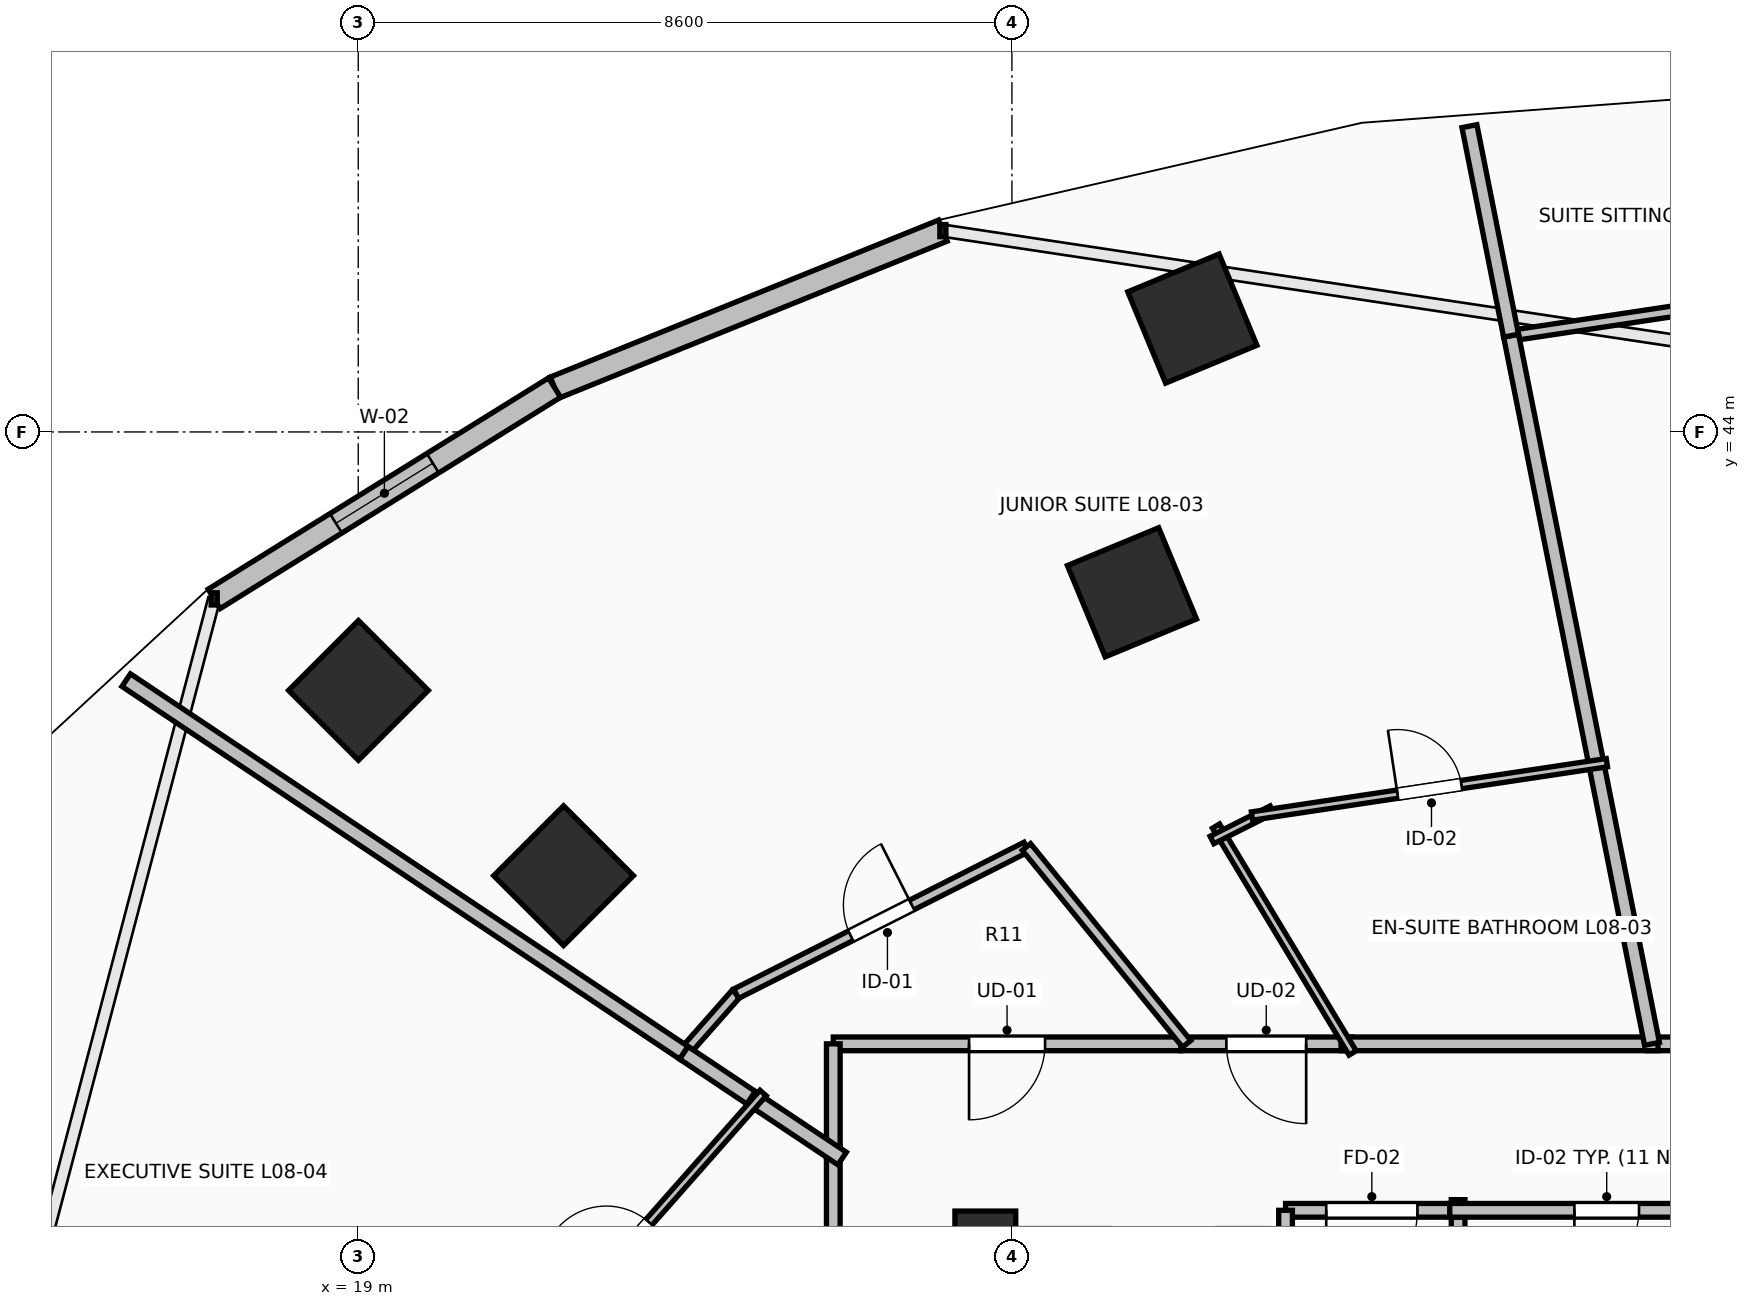
"""IFC4 building model, lengths in metres.
Left out: names, types, materials, properties, quantities, classifications, styles, units other than length and angle.
Written with IfcOpenShell. Run it as: python <this file> out.ifc"""

import sys

from ifc_helpers import new_model, si_unit, direction, frame, frame_2d, origin, origin_2d, place, context, subcontext, project, spatial, rectangle, extrude, element, fill, save


model = new_model("IFC4")
c1 = context("Model", 3, precision=1e-05, world=origin(), true_north=direction((0.0, 1.0)))
c2 = subcontext(c1, "Body", "Model", "MODEL_VIEW")
j1 = project(units=[si_unit("LENGTHUNIT", "METRE"), si_unit("PLANEANGLEUNIT", "RADIAN")], contexts=[c1])
p1 = place(None, origin())
s1 = spatial("IfcSite", under=j1, at=p1, CompositionType="ELEMENT")
p2 = place(p1, origin())
s2 = spatial("IfcBuilding", under=s1, at=p2, CompositionType="ELEMENT")
p3 = place(p2, frame((0.0, 0.0, 34.5)))
s3 = spatial("IfcBuildingStorey", under=s2, at=p3, CompositionType="ELEMENT", Elevation=34.5)
for number, where, z_axis, x_axis in (
    (1, (29.179, 41.891, 0.0), (0.0, 0.0, 1.0), (-0.383, 0.924, 0.0)),
    (2, (21.701, 38.162, 0.0), (0.0, 0.0, 1.0), (-0.707, 0.707, 0.0)),
    (3, (29.974, 45.492, 0.0), (0.0, 0.0, 1.0), (-0.383, 0.924, 0.0)),
    (4, (19.003, 40.6, 0.0), (0.0, 0.0, 1.0), (-0.707, 0.707, 0.0)),
):
    element("IfcColumn", number, at=place(p3, frame(where, z_axis=z_axis, x_axis=x_axis)), inside=s3, PredefinedType="COLUMN", context=c2, shape_type="SweptSolid", body=[
        extrude(rectangle(XDim=1.3, YDim=1.3, at=origin_2d()), origin(), (0.0, 0.0, 1.0), 3.5),
    ])
p4 = place(p3, frame((27.25, 33.15, 0.0), z_axis=(0.0, 0.0, 1.0), x_axis=(1.0, 0.0, 0.0)))
e5 = element("IfcColumn", 5, at=p4, inside=s3, PredefinedType="PILASTER", context=c2, shape_type="SweptSolid", body=[
    extrude(rectangle(XDim=0.8, YDim=1.2, at=origin_2d()), origin(), (0.0, 0.0, 1.0), 3.5),
])
p5 = place(p3, frame((26.692, 46.649, 0.0), z_axis=(0.0, 0.0, 1.0), x_axis=(-0.927095325176, -0.374825636845, 0.0)))
e6 = element("IfcWall", 6, at=p5, inside=s3, PredefinedType="STANDARD", context=c2, shape_type="SweptSolid", body=[
    extrude(rectangle(XDim=5.51, YDim=0.3, at=frame_2d((2.755, 0.0))), origin(), (0.0, 0.0, 1.0), 3.24),
])
p6 = place(p3, frame((21.583, 44.583, 0.0), z_axis=(0.0, 0.0, 1.0), x_axis=(-0.849633724826, -0.527373239404, 0.0)))
e7 = element("IfcWall", 7, at=p6, inside=s3, PredefinedType="STANDARD", context=c2, shape_type="SweptSolid", body=[
    extrude(rectangle(XDim=5.271, YDim=0.3, at=frame_2d((2.635, 0.0))), origin(), (0.0, 0.0, 1.0), 3.24),
])
p7 = place(p6, frame((1.885, 0.0, 0.85)))
e8 = element("IfcOpeningElement", 8, at=p7, cuts=e7, PredefinedType="OPENING", context=c2, shape_type="SweptSolid", body=[
    extrude(rectangle(XDim=1.5, YDim=2.19, at=frame_2d((0.75, 1.095))), frame((0.0, 0.165, 0.0), z_axis=(0.0, -1.0, 0.0), x_axis=(1.0, 0.0, 0.0)), (0.0, 0.0, 1.0), 0.33),
])
p8 = place(p3, frame((33.47, 30.34, 0.0), z_axis=(0.0, 0.0, 1.0), x_axis=(0.0, 1.0, 0.0)))
e9 = element("IfcWall", 9, at=p8, inside=s3, PredefinedType="PARTITIONING", context=c2, shape_type="SweptSolid", body=[
    extrude(rectangle(XDim=3.56, YDim=0.18, at=frame_2d((1.78, 0.0))), origin(), (0.0, 0.0, 1.0), 3.24),
])
p9 = place(p3, frame((33.47, 33.76, 0.0), z_axis=(0.0, 0.0, 1.0), x_axis=(-1.0, 0.0, 0.0)))
e10 = element("IfcWall", 10, at=p9, inside=s3, PredefinedType="PARTITIONING", context=c2, shape_type="SweptSolid", body=[
    extrude(rectangle(XDim=2.27, YDim=0.18, at=frame_2d((1.135, 0.0))), origin(), (0.0, 0.0, 1.0), 3.24),
])
p10 = place(p9, frame((0.535, 0.0, 0.0)))
e11 = element("IfcOpeningElement", 11, at=p10, cuts=e10, PredefinedType="OPENING", context=c2, shape_type="SweptSolid", body=[
    extrude(rectangle(XDim=1.2, YDim=2.15, at=frame_2d((0.6, 1.075))), frame((0.0, 0.105, 0.0), z_axis=(0.0, -1.0, 0.0), x_axis=(1.0, 0.0, 0.0)), (0.0, 0.0, 1.0), 0.21),
])
p11 = place(p3, frame((31.2, 33.76, 0.0), z_axis=(0.0, 0.0, 1.0), x_axis=(0.0, -1.0, 0.0)))
e12 = element("IfcWall", 12, at=p11, inside=s3, PredefinedType="PARTITIONING", context=c2, shape_type="SweptSolid", body=[
    extrude(rectangle(XDim=0.56, YDim=0.18, at=frame_2d((0.28, 0.0))), origin(), (0.0, 0.0, 1.0), 3.24),
])
p12 = place(p3, frame((37.49, 33.76, 0.0), z_axis=(0.0, 0.0, 1.0), x_axis=(-1.0, 0.0, 0.0)))
e13 = element("IfcWall", 13, at=p12, inside=s3, PredefinedType="PARTITIONING", context=c2, shape_type="SweptSolid", body=[
    extrude(rectangle(XDim=4.13, YDim=0.18, at=frame_2d((2.065, 0.0))), origin(), (0.0, 0.0, 1.0), 3.24),
])
p13 = place(p12, frame((1.64, 0.0, 0.0)))
e14 = element("IfcOpeningElement", 14, at=p13, cuts=e13, PredefinedType="OPENING", context=c2, shape_type="SweptSolid", body=[
    extrude(rectangle(XDim=0.85, YDim=2.1, at=frame_2d((0.425, 1.05))), frame((0.0, 0.105, 0.0), z_axis=(0.0, -1.0, 0.0), x_axis=(1.0, 0.0, 0.0)), (0.0, 0.0, 1.0), 0.21),
])
p14 = place(p3, frame((40.534, 35.95, 0.0), z_axis=(0.0, 0.0, 1.0), x_axis=(-1.0, 0.0, 0.0)))
e15 = element("IfcWall", 15, at=p14, inside=s3, PredefinedType="PARTITIONING", context=c2, shape_type="SweptSolid", body=[
    extrude(rectangle(XDim=4.574, YDim=0.18, at=frame_2d((2.287, 0.0))), origin(), (0.0, 0.0, 1.0), 3.24),
])
p15 = place(p14, frame((1.762, 0.0, 0.0)))
e16 = element("IfcOpeningElement", 16, at=p15, cuts=e15, PredefinedType="OPENING", context=c2, shape_type="SweptSolid", body=[
    extrude(rectangle(XDim=1.05, YDim=2.2, at=frame_2d((0.525, 1.1))), frame((0.0, 0.105, 0.0), z_axis=(0.0, -1.0, 0.0), x_axis=(1.0, 0.0, 0.0)), (0.0, 0.0, 1.0), 0.21),
])
p16 = place(p3, frame((32.07, 35.95, 0.0), z_axis=(0.0, 0.0, 1.0), x_axis=(-1.0, 0.0, 0.0)))
e17 = element("IfcWall", 17, at=p16, inside=s3, PredefinedType="PARTITIONING", context=c2, shape_type="SweptSolid", body=[
    extrude(rectangle(XDim=2.248, YDim=0.18, at=frame_2d((1.124, 0.0))), origin(), (0.0, 0.0, 1.0), 2.432),
])
p17 = place(p16, frame((0.599, 0.0, 0.0)))
e18 = element("IfcOpeningElement", 18, at=p17, cuts=e17, PredefinedType="OPENING", context=c2, shape_type="SweptSolid", body=[
    extrude(rectangle(XDim=1.05, YDim=2.2, at=frame_2d((0.525, 1.1))), frame((0.0, 0.105, 0.0), z_axis=(0.0, -1.0, 0.0), x_axis=(1.0, 0.0, 0.0)), (0.0, 0.0, 1.0), 0.21),
])
p18 = place(p3, frame((36.1, 35.95, 0.0), z_axis=(0.0, 0.0, 1.0), x_axis=(-1.0, 0.0, 0.0)))
e19 = element("IfcWall", 19, at=p18, inside=s3, PredefinedType="PARTITIONING", context=c2, shape_type="SweptSolid", body=[
    extrude(rectangle(XDim=4.17, YDim=0.18, at=frame_2d((2.085, 0.0))), origin(), (0.0, 0.0, 1.0), 3.24),
])
p19 = place(p3, frame((29.822, 35.95, 0.0), z_axis=(0.0, 0.0, 1.0), x_axis=(-1.0, 0.0, 0.0)))
e20 = element("IfcWall", 20, at=p19, inside=s3, PredefinedType="PARTITIONING", context=c2, shape_type="SweptSolid", body=[
    extrude(rectangle(XDim=4.572, YDim=0.18, at=frame_2d((2.286, 0.0))), origin(), (0.0, 0.0, 1.0), 2.432),
])
p20 = place(p19, frame((1.786, 0.0, 0.0)))
e21 = element("IfcOpeningElement", 21, at=p20, cuts=e20, PredefinedType="OPENING", context=c2, shape_type="SweptSolid", body=[
    extrude(rectangle(XDim=1.0, YDim=2.15, at=frame_2d((0.5, 1.075))), frame((0.0, 0.105, 0.0), z_axis=(0.0, -1.0, 0.0), x_axis=(1.0, 0.0, 0.0)), (0.0, 0.0, 1.0), 0.21),
])
p21 = place(p3, frame((25.25, 35.95, 0.0), z_axis=(0.0, 0.0, 1.0), x_axis=(0.0, -1.0, 0.0)))
e22 = element("IfcWall", 22, at=p21, inside=s3, PredefinedType="PARTITIONING", context=c2, shape_type="SweptSolid", body=[
    extrude(rectangle(XDim=1.491, YDim=0.18, at=frame_2d((0.746, 0.0))), origin(), (0.0, 0.0, 1.0), 2.432),
])
p22 = place(p3, frame((25.25, 34.599, 0.0), z_axis=(0.0, 0.0, 1.0), x_axis=(0.0, -1.0, 0.0)))
e23 = element("IfcWall", 23, at=p22, inside=s3, PredefinedType="PARTITIONING", context=c2, shape_type="SweptSolid", body=[
    extrude(rectangle(XDim=5.51, YDim=0.18, at=frame_2d((2.755, 0.0))), origin(), (0.0, 0.0, 1.0), 2.432),
])
p23 = place(p3, frame((38.0, 45.844, 0.0), z_axis=(0.0, 0.0, 1.0), x_axis=(-0.988862311426, -0.148833225599, 0.0)))
e24 = element("IfcWall", 24, at=p23, inside=s3, PredefinedType="PARTITIONING", context=c2, shape_type="SweptSolid", body=[
    extrude(rectangle(XDim=3.876, YDim=0.14, at=frame_2d((1.938, 0.0))), origin(), (0.0, 0.0, 1.0), 2.624),
])
p24 = place(p3, frame((34.167, 45.267, 0.0), z_axis=(0.0, 0.0, 1.0), x_axis=(0.19516219459, -0.980770981322, 0.0)))
e25 = element("IfcWall", 25, at=p24, inside=s3, PredefinedType="PARTITIONING", context=c2, shape_type="SweptSolid", body=[
    extrude(rectangle(XDim=9.5, YDim=0.2, at=frame_2d((4.75, 0.0))), origin(), (0.0, 0.0, 1.0), 2.432),
])
p25 = place(p3, frame((33.619, 48.023, 0.0), z_axis=(0.0, 0.0, 1.0), x_axis=(0.195063341769, -0.980790646722, 0.0)))
e26 = element("IfcWall", 26, at=p25, inside=s3, PredefinedType="PARTITIONING", context=c2, shape_type="SweptSolid", body=[
    extrude(rectangle(XDim=2.81, YDim=0.2, at=frame_2d((1.405, 0.0))), origin(), (0.0, 0.0, 1.0), 2.624),
])
p26 = place(p3, frame((32.082, 35.83, 0.0), z_axis=(0.0, 0.0, 1.0), x_axis=(-0.51585529038, 0.856675737597, 0.0)))
e27 = element("IfcWall", 27, at=p26, inside=s3, PredefinedType="PARTITIONING", context=c2, shape_type="SweptSolid", body=[
    extrude(rectangle(XDim=3.484, YDim=0.11, at=frame_2d((1.742, 0.0))), origin(), (0.0, 0.0, 1.0), 2.432),
])
p27 = place(p3, frame((30.232, 38.632, 0.0), z_axis=(0.0, 0.0, 1.0), x_axis=(0.892376579336, 0.451291525129, 0.0)))
e28 = element("IfcWall", 28, at=p27, inside=s3, PredefinedType="PARTITIONING", context=c2, shape_type="SweptSolid", body=[
    extrude(rectangle(XDim=0.885, YDim=0.11, at=frame_2d((0.442, 0.0))), origin(), (0.0, 0.0, 1.0), 3.24),
])
p28 = place(p3, frame((30.759, 38.947, 0.0), z_axis=(0.0, 0.0, 1.0), x_axis=(0.9889029502, 0.148562966739, 0.0)))
e29 = element("IfcWall", 29, at=p28, inside=s3, PredefinedType="PARTITIONING", context=c2, shape_type="SweptSolid", body=[
    extrude(rectangle(XDim=4.721, YDim=0.11, at=frame_2d((2.361, 0.0))), origin(), (0.0, 0.0, 1.0), 2.432),
])
p29 = place(p28, frame((1.936, 0.0, 0.0)))
e30 = element("IfcOpeningElement", 30, at=p29, cuts=e29, PredefinedType="OPENING", context=c2, shape_type="SweptSolid", body=[
    extrude(rectangle(XDim=0.85, YDim=2.1, at=frame_2d((0.425, 1.05))), frame((0.0, 0.07, 0.0), z_axis=(0.0, -1.0, 0.0), x_axis=(1.0, 0.0, 0.0)), (0.0, 0.0, 1.0), 0.14),
])
p30 = place(p3, frame((23.284, 35.832, 0.0), z_axis=(0.0, 0.0, 1.0), x_axis=(0.662462125237, 0.749095409561, 0.0)))
e31 = element("IfcWall", 31, at=p30, inside=s3, PredefinedType="PARTITIONING", context=c2, shape_type="SweptSolid", body=[
    extrude(rectangle(XDim=1.037, YDim=0.14, at=frame_2d((0.519, 0.0))), origin(), (0.0, 0.0, 1.0), 2.432),
])
p31 = place(p3, frame((23.971, 36.609, 0.0), z_axis=(0.0, 0.0, 1.0), x_axis=(0.892445030909, 0.451156144596, 0.0)))
e32 = element("IfcWall", 32, at=p31, inside=s3, PredefinedType="PARTITIONING", context=c2, shape_type="SweptSolid", body=[
    extrude(rectangle(XDim=4.281, YDim=0.14, at=frame_2d((2.14, 0.0))), origin(), (0.0, 0.0, 1.0), 3.24),
])
p32 = place(p31, frame((1.69, 0.0, 0.0)))
e33 = element("IfcOpeningElement", 33, at=p32, cuts=e32, PredefinedType="OPENING", context=c2, shape_type="SweptSolid", body=[
    extrude(rectangle(XDim=0.9, YDim=2.1, at=frame_2d((0.45, 1.05))), frame((0.0, 0.085, 0.0), z_axis=(0.0, -1.0, 0.0), x_axis=(1.0, 0.0, 0.0)), (0.0, 0.0, 1.0), 0.17),
])
p33 = place(p3, frame((27.791, 38.54, 0.0), z_axis=(0.0, 0.0, 1.0), x_axis=(0.631217195835, -0.775606118904, 0.0)))
e34 = element("IfcWall", 34, at=p33, inside=s3, PredefinedType="PARTITIONING", context=c2, shape_type="SweptSolid", body=[
    extrude(rectangle(XDim=3.339, YDim=0.14, at=frame_2d((1.67, 0.0))), origin(), (0.0, 0.0, 1.0), 2.432),
])
p34 = place(p3, frame((15.947, 40.735, 0.0), z_axis=(0.0, 0.0, 1.0), x_axis=(0.831432604336, -0.555625615363, 0.0)))
e35 = element("IfcWall", 35, at=p34, inside=s3, PredefinedType="PARTITIONING", context=c2, shape_type="SweptSolid", body=[
    extrude(rectangle(XDim=8.824, YDim=0.2, at=frame_2d((4.412, 0.0))), origin(), (0.0, 0.0, 1.0), 2.624),
])
p35 = place(p3, frame((23.284, 35.832, 0.0), z_axis=(0.0, 0.0, 1.0), x_axis=(0.831550226979, -0.555449565677, 0.0)))
e36 = element("IfcWall", 36, at=p35, inside=s3, PredefinedType="PARTITIONING", context=c2, shape_type="SweptSolid", body=[
    extrude(rectangle(XDim=1.203, YDim=0.2, at=frame_2d((0.601, 0.0))), origin(), (0.0, 0.0, 1.0), 2.972),
])
p36 = place(p3, frame((24.167, 35.241, 0.0), z_axis=(0.0, 0.0, 1.0), x_axis=(0.831815696492, -0.555051931868, 0.0)))
e37 = element("IfcWall", 37, at=p36, inside=s3, PredefinedType="PARTITIONING", context=c2, shape_type="SweptSolid", body=[
    extrude(rectangle(XDim=1.441, YDim=0.2, at=frame_2d((0.721, 0.0))), origin(), (0.0, 0.0, 1.0), 2.972),
])
p37 = place(p3, frame((20.76, 31.266, 0.0), z_axis=(0.0, 0.0, 1.0), x_axis=(0.662087707802, 0.749426358742, 0.0)))
e38 = element("IfcWall", 38, at=p37, inside=s3, PredefinedType="PARTITIONING", context=c2, shape_type="SweptSolid", body=[
    extrude(rectangle(XDim=5.387, YDim=0.11, at=frame_2d((2.693, 0.0))), origin(), (0.0, 0.0, 1.0), 2.972),
])
p38 = place(p37, frame((2.268, 0.0, 0.0)))
e39 = element("IfcOpeningElement", 39, at=p38, cuts=e38, PredefinedType="OPENING", context=c2, shape_type="SweptSolid", body=[
    extrude(rectangle(XDim=0.85, YDim=2.1, at=frame_2d((0.425, 1.05))), frame((0.0, 0.07, 0.0), z_axis=(0.0, -1.0, 0.0), x_axis=(1.0, 0.0, 0.0)), (0.0, 0.0, 1.0), 0.14),
])
p39 = place(p7, origin())
e40 = element("IfcWindow", 40, at=p39, inside=s3, PartitioningType="SINGLE_PANEL", PredefinedType="WINDOW", context=c2, shape_type="SweptSolid", body=[
    extrude(rectangle(XDim=1.5, YDim=2.19, at=frame_2d((0.75, 1.095))), frame((0.0, 0.03, 0.0), z_axis=(0.0, -1.0, 0.0), x_axis=(1.0, 0.0, 0.0)), (0.0, 0.0, 1.0), 0.06),
])
fill(e8, e40)
p40 = place(p10, origin())
e41 = element("IfcDoor", 41, at=p40, inside=s3, OperationType="SINGLE_SWING_RIGHT", PredefinedType="DOOR", context=c2, shape_type="SweptSolid", body=[
    extrude(rectangle(XDim=1.2, YDim=2.15, at=frame_2d((0.6, 1.075))), frame((0.0, 0.025, 0.0), z_axis=(0.0, -1.0, 0.0), x_axis=(1.0, 0.0, 0.0)), (0.0, 0.0, 1.0), 0.05),
])
fill(e11, e41)
p41 = place(p13, origin())
e42 = element("IfcDoor", 42, at=p41, inside=s3, OperationType="SINGLE_SWING_RIGHT", PredefinedType="DOOR", context=c2, shape_type="SweptSolid", body=[
    extrude(rectangle(XDim=0.85, YDim=2.1, at=frame_2d((0.425, 1.05))), frame((0.0, 0.025, 0.0), z_axis=(0.0, -1.0, 0.0), x_axis=(1.0, 0.0, 0.0)), (0.0, 0.0, 1.0), 0.05),
])
fill(e14, e42)
p42 = place(p17, origin())
e43 = element("IfcDoor", 43, at=p42, inside=s3, OperationType="SINGLE_SWING_LEFT", PredefinedType="DOOR", context=c2, shape_type="SweptSolid", body=[
    extrude(rectangle(XDim=1.05, YDim=2.2, at=frame_2d((0.525, 1.1))), frame((0.0, 0.025, 0.0), z_axis=(0.0, -1.0, 0.0), x_axis=(1.0, 0.0, 0.0)), (0.0, 0.0, 1.0), 0.05),
])
fill(e18, e43)
p43 = place(p20, origin())
e44 = element("IfcDoor", 44, at=p43, inside=s3, OperationType="SINGLE_SWING_RIGHT", PredefinedType="DOOR", context=c2, shape_type="SweptSolid", body=[
    extrude(rectangle(XDim=1.0, YDim=2.15, at=frame_2d((0.5, 1.075))), frame((0.0, 0.025, 0.0), z_axis=(0.0, -1.0, 0.0), x_axis=(1.0, 0.0, 0.0)), (0.0, 0.0, 1.0), 0.05),
])
fill(e21, e44)
p44 = place(p29, origin())
e45 = element("IfcDoor", 45, at=p44, inside=s3, OperationType="SINGLE_SWING_LEFT", PredefinedType="DOOR", context=c2, shape_type="SweptSolid", body=[
    extrude(rectangle(XDim=0.85, YDim=2.1, at=frame_2d((0.425, 1.05))), frame((0.0, 0.025, 0.0), z_axis=(0.0, -1.0, 0.0), x_axis=(1.0, 0.0, 0.0)), (0.0, 0.0, 1.0), 0.05),
])
fill(e30, e45)
p45 = place(p32, origin())
e46 = element("IfcDoor", 46, at=p45, inside=s3, OperationType="SINGLE_SWING_RIGHT", PredefinedType="DOOR", context=c2, shape_type="SweptSolid", body=[
    extrude(rectangle(XDim=0.9, YDim=2.1, at=frame_2d((0.45, 1.05))), frame((0.0, 0.025, 0.0), z_axis=(0.0, -1.0, 0.0), x_axis=(1.0, 0.0, 0.0)), (0.0, 0.0, 1.0), 0.05),
])
fill(e33, e46)
p46 = place(p38, origin())
e47 = element("IfcDoor", 47, at=p46, inside=s3, OperationType="SINGLE_SWING_LEFT", PredefinedType="DOOR", context=c2, shape_type="SweptSolid", body=[
    extrude(rectangle(XDim=0.85, YDim=2.1, at=frame_2d((0.425, 1.05))), frame((0.0, 0.025, 0.0), z_axis=(0.0, -1.0, 0.0), x_axis=(1.0, 0.0, 0.0)), (0.0, 0.0, 1.0), 0.05),
])
fill(e39, e47)
save(model, sys.argv[1])
